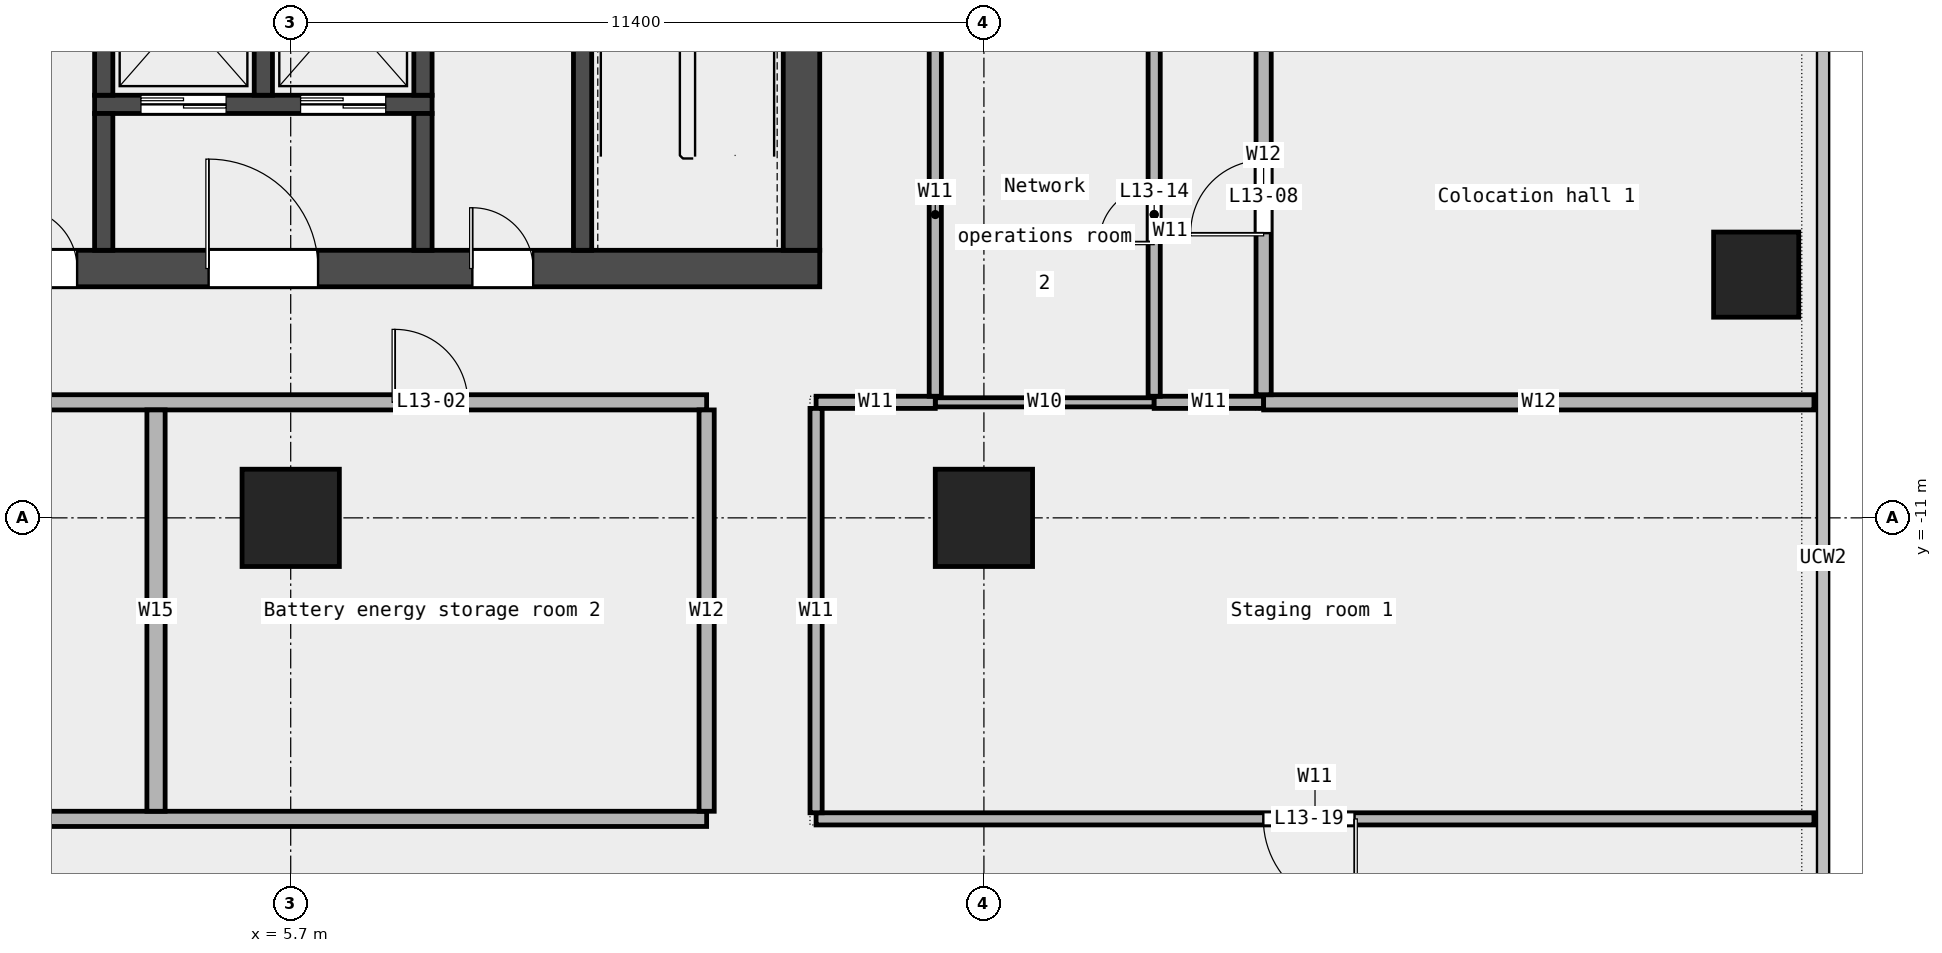
"""IFC4 building model, lengths in metres.
Left out: names, types, materials, properties, quantities, classifications, styles, units other than length and angle.
Written with IfcOpenShell. Run it as: python <this file> out.ifc"""

import sys

from ifc_helpers import new_model, si_unit, direction, frame, frame_2d, origin, origin_2d, place, context, subcontext, project, spatial, rectangle, extrude, element, fill, save


model = new_model("IFC4")
c1 = context("Model", 3, precision=1e-05, world=origin(), true_north=direction((0.0, 1.0)))
c2 = subcontext(c1, "Body", "Model", "MODEL_VIEW")
j1 = project(units=[si_unit("LENGTHUNIT", "METRE"), si_unit("PLANEANGLEUNIT", "RADIAN")], contexts=[c1])
p1 = place(None, origin())
s1 = spatial("IfcSite", under=j1, at=p1, CompositionType="ELEMENT")
p2 = place(p1, origin())
s2 = spatial("IfcBuilding", under=s1, at=p2, CompositionType="ELEMENT")
p3 = place(p2, frame((0.0, 0.0, 69.4)))
s3 = spatial("IfcBuildingStorey", under=s2, at=p3, CompositionType="ELEMENT", Elevation=69.4)
p4 = place(p3, frame((29.8, -7.0, 0.0), z_axis=(0.0, 0.0, 1.0), x_axis=(1.0, 0.0, 0.0)))
e1 = element("IfcColumn", 1, at=p4, inside=s3, PredefinedType="COLUMN", context=c2, shape_type="SweptSolid", body=[
    extrude(rectangle(XDim=1.4, YDim=1.4, at=origin_2d()), origin(), (0.0, 0.0, 1.0), 4.35),
])
for number, where, z_axis, x_axis in (
    (2, (5.7, -11.0, 0.0), (0.0, 0.0, 1.0), (1.0, 0.0, 0.0)),
    (3, (17.1, -11.0, 0.0), (0.0, 0.0, 1.0), (1.0, 0.0, 0.0)),
):
    element("IfcColumn", number, at=place(p3, frame(where, z_axis=z_axis, x_axis=x_axis)), inside=s3, PredefinedType="COLUMN", context=c2, shape_type="SweptSolid", body=[
        extrude(rectangle(XDim=1.6, YDim=1.6, at=origin_2d()), origin(), (0.0, 0.0, 1.0), 4.35),
    ])
p5 = place(p3, frame((14.34, -15.95, 0.0), z_axis=(0.0, 0.0, 1.0), x_axis=(1.0, 0.0, 0.0)))
e4 = element("IfcWall", 4, at=p5, inside=s3, PredefinedType="PARTITIONING", context=c2, shape_type="SweptSolid", body=[
    extrude(rectangle(XDim=16.41, YDim=0.2, at=frame_2d((8.205, 0.0))), origin(), (0.0, 0.0, 1.0), 4.35),
])
p6 = place(p5, frame((7.355, 0.0, 0.0)))
e5 = element("IfcOpeningElement", 5, at=p6, cuts=e4, PredefinedType="OPENING", context=c2, shape_type="SweptSolid", body=[
    extrude(rectangle(XDim=1.5, YDim=2.1, at=frame_2d((0.75, 1.05))), frame((0.0, 0.112, 0.0), z_axis=(0.0, -1.0, 0.0), x_axis=(1.0, 0.0, 0.0)), (0.0, 0.0, 1.0), 0.224),
])
p7 = place(p3, frame((-10.1, -15.95, 0.0), z_axis=(0.0, 0.0, 1.0), x_axis=(1.0, 0.0, 0.0)))
e6 = element("IfcWall", 6, at=p7, inside=s3, PredefinedType="PARTITIONING", context=c2, shape_type="SweptSolid", body=[
    extrude(rectangle(XDim=22.64, YDim=0.25, at=frame_2d((11.32, 0.0))), origin(), (0.0, 0.0, 1.0), 4.35),
])
p8 = place(p3, frame((16.3, -9.1, 0.0), z_axis=(0.0, 0.0, 1.0), x_axis=(1.0, 0.0, 0.0)))
e7 = element("IfcWall", 7, at=p8, inside=s3, PredefinedType="PARTITIONING", context=c2, shape_type="SweptSolid", body=[
    extrude(rectangle(XDim=3.6, YDim=0.15, at=frame_2d((1.8, 0.0))), origin(), (0.0, 0.0, 1.0), 4.35),
])
p9 = place(p3, frame((14.34, -9.1, 0.0), z_axis=(0.0, 0.0, 1.0), x_axis=(1.0, 0.0, 0.0)))
e8 = element("IfcWall", 8, at=p9, inside=s3, PredefinedType="PARTITIONING", context=c2, shape_type="SweptSolid", body=[
    extrude(rectangle(XDim=1.96, YDim=0.2, at=frame_2d((0.98, 0.0))), origin(), (0.0, 0.0, 1.0), 4.35),
])
p10 = place(p3, frame((19.9, -9.1, 0.0), z_axis=(0.0, 0.0, 1.0), x_axis=(1.0, 0.0, 0.0)))
e9 = element("IfcWall", 9, at=p10, inside=s3, PredefinedType="PARTITIONING", context=c2, shape_type="SweptSolid", body=[
    extrude(rectangle(XDim=1.8, YDim=0.2, at=frame_2d((0.9, 0.0))), origin(), (0.0, 0.0, 1.0), 4.35),
])
p11 = place(p3, frame((-10.1, -9.1, 0.0), z_axis=(0.0, 0.0, 1.0), x_axis=(1.0, 0.0, 0.0)))
e10 = element("IfcWall", 10, at=p11, inside=s3, PredefinedType="PARTITIONING", context=c2, shape_type="SweptSolid", body=[
    extrude(rectangle(XDim=22.64, YDim=0.25, at=frame_2d((11.32, 0.0))), origin(), (0.0, 0.0, 1.0), 4.35),
])
p12 = place(p11, frame((17.512, 0.0, 0.0)))
e11 = element("IfcOpeningElement", 11, at=p12, cuts=e10, PredefinedType="OPENING", context=c2, shape_type="SweptSolid", body=[
    extrude(rectangle(XDim=1.2, YDim=2.1, at=frame_2d((0.6, 1.05))), frame((0.0, 0.137, 0.0), z_axis=(0.0, -1.0, 0.0), x_axis=(1.0, 0.0, 0.0)), (0.0, 0.0, 1.0), 0.274),
])
p13 = place(p11, frame((6.192, 0.0, 0.0)))
e12 = element("IfcOpeningElement", 12, at=p13, cuts=e10, PredefinedType="OPENING", context=c2, shape_type="SweptSolid", body=[
    extrude(rectangle(XDim=1.2, YDim=2.1, at=frame_2d((0.6, 1.05))), frame((0.0, 0.137, 0.0), z_axis=(0.0, -1.0, 0.0), x_axis=(1.0, 0.0, 0.0)), (0.0, 0.0, 1.0), 0.274),
])
p14 = place(p3, frame((21.7, -9.1, 0.0), z_axis=(0.0, 0.0, 1.0), x_axis=(1.0, 0.0, 0.0)))
e13 = element("IfcWall", 13, at=p14, inside=s3, PredefinedType="PARTITIONING", context=c2, shape_type="SweptSolid", body=[
    extrude(rectangle(XDim=9.05, YDim=0.25, at=frame_2d((4.525, 0.0))), origin(), (0.0, 0.0, 1.0), 4.35),
])
p15 = place(p3, frame((3.485, -15.825, 0.0), z_axis=(0.0, 0.0, 1.0), x_axis=(0.0, 1.0, 0.0)))
e14 = element("IfcWall", 14, at=p15, inside=s3, PredefinedType="PARTITIONING", context=c2, shape_type="SweptSolid", body=[
    extrude(rectangle(XDim=6.6, YDim=0.3, at=frame_2d((3.3, 0.0))), origin(), (0.0, 0.0, 1.0), 4.35),
])
p16 = place(p3, frame((12.54, -15.825, 0.0), z_axis=(0.0, 0.0, 1.0), x_axis=(0.0, 1.0, 0.0)))
e15 = element("IfcWall", 15, at=p16, inside=s3, PredefinedType="PARTITIONING", context=c2, shape_type="SweptSolid", body=[
    extrude(rectangle(XDim=6.6, YDim=0.25, at=frame_2d((3.3, 0.0))), origin(), (0.0, 0.0, 1.0), 4.35),
])
p17 = place(p3, frame((14.34, -15.85, 0.0), z_axis=(0.0, 0.0, 1.0), x_axis=(0.0, 1.0, 0.0)))
e16 = element("IfcWall", 16, at=p17, inside=s3, PredefinedType="PARTITIONING", context=c2, shape_type="SweptSolid", body=[
    extrude(rectangle(XDim=6.65, YDim=0.2, at=frame_2d((3.325, 0.0))), origin(), (0.0, 0.0, 1.0), 4.35),
])
p18 = place(p3, frame((16.3, -9.0, 0.0), z_axis=(0.0, 0.0, 1.0), x_axis=(0.0, 1.0, 0.0)))
e17 = element("IfcWall", 17, at=p18, inside=s3, PredefinedType="PARTITIONING", context=c2, shape_type="SweptSolid", body=[
    extrude(rectangle(XDim=5.975, YDim=0.2, at=frame_2d((2.988, 0.0))), origin(), (0.0, 0.0, 1.0), 4.35),
])
p19 = place(p3, frame((19.9, -9.0, 0.0), z_axis=(0.0, 0.0, 1.0), x_axis=(0.0, 1.0, 0.0)))
e18 = element("IfcWall", 18, at=p19, inside=s3, PredefinedType="PARTITIONING", context=c2, shape_type="SweptSolid", body=[
    extrude(rectangle(XDim=5.975, YDim=0.2, at=frame_2d((2.988, 0.0))), origin(), (0.0, 0.0, 1.0), 4.35),
])
p20 = place(p19, frame((2.538, 0.0, 0.0)))
e19 = element("IfcOpeningElement", 19, at=p20, cuts=e18, PredefinedType="OPENING", context=c2, shape_type="SweptSolid", body=[
    extrude(rectangle(XDim=0.9, YDim=2.1, at=frame_2d((0.45, 1.05))), frame((0.0, 0.112, 0.0), z_axis=(0.0, -1.0, 0.0), x_axis=(1.0, 0.0, 0.0)), (0.0, 0.0, 1.0), 0.224),
])
p21 = place(p3, frame((21.7, -8.975, 0.0), z_axis=(0.0, 0.0, 1.0), x_axis=(0.0, 1.0, 0.0)))
e20 = element("IfcWall", 20, at=p21, inside=s3, PredefinedType="PARTITIONING", context=c2, shape_type="SweptSolid", body=[
    extrude(rectangle(XDim=6.515, YDim=0.25, at=frame_2d((3.258, 0.0))), origin(), (0.0, 0.0, 1.0), 4.35),
])
p22 = place(p21, frame((2.657, 0.0, 0.0)))
e21 = element("IfcOpeningElement", 21, at=p22, cuts=e20, PredefinedType="OPENING", context=c2, shape_type="SweptSolid", body=[
    extrude(rectangle(XDim=1.2, YDim=2.1, at=frame_2d((0.6, 1.05))), frame((0.0, 0.137, 0.0), z_axis=(0.0, -1.0, 0.0), x_axis=(1.0, 0.0, 0.0)), (0.0, 0.0, 1.0), 0.274),
])
p23 = place(p3, frame((-14.4, -6.9, 0.0), z_axis=(0.0, 0.0, 1.0), x_axis=(1.0, 0.0, 0.0)))
e22 = element("IfcWall", 22, at=p23, inside=s3, PredefinedType="SHEAR", context=c2, shape_type="SweptSolid", body=[
    extrude(rectangle(XDim=28.8, YDim=0.6, at=frame_2d((14.4, 0.0))), origin(), (0.0, 0.0, 1.0), 4.5),
])
p24 = place(p23, frame((4.337, 0.0, 0.0)))
e23 = element("IfcOpeningElement", 23, at=p24, cuts=e22, PredefinedType="OPENING", context=c2, shape_type="SweptSolid", body=[
    extrude(rectangle(XDim=1.0, YDim=2.1, at=frame_2d((0.5, 1.05))), frame((0.0, 0.312, 0.0), z_axis=(0.0, -1.0, 0.0), x_axis=(1.0, 0.0, 0.0)), (0.0, 0.0, 1.0), 0.624),
])
p25 = place(p23, frame((6.212, 0.0, 0.0)))
e24 = element("IfcOpeningElement", 24, at=p25, cuts=e22, PredefinedType="OPENING", context=c2, shape_type="SweptSolid", body=[
    extrude(rectangle(XDim=1.0, YDim=2.1, at=frame_2d((0.5, 1.05))), frame((0.0, 0.312, 0.0), z_axis=(0.0, -1.0, 0.0), x_axis=(1.0, 0.0, 0.0)), (0.0, 0.0, 1.0), 0.624),
])
p26 = place(p23, frame((10.8, 0.0, 0.0)))
e25 = element("IfcOpeningElement", 25, at=p26, cuts=e22, PredefinedType="OPENING", context=c2, shape_type="SweptSolid", body=[
    extrude(rectangle(XDim=1.2, YDim=2.1, at=frame_2d((0.6, 1.05))), frame((0.0, 0.312, 0.0), z_axis=(0.0, -1.0, 0.0), x_axis=(1.0, 0.0, 0.0)), (0.0, 0.0, 1.0), 0.624),
])
p27 = place(p23, frame((15.587, 0.0, 0.0)))
e26 = element("IfcOpeningElement", 26, at=p27, cuts=e22, PredefinedType="OPENING", context=c2, shape_type="SweptSolid", body=[
    extrude(rectangle(XDim=1.0, YDim=2.1, at=frame_2d((0.5, 1.05))), frame((0.0, 0.312, 0.0), z_axis=(0.0, -1.0, 0.0), x_axis=(1.0, 0.0, 0.0)), (0.0, 0.0, 1.0), 0.624),
])
p28 = place(p23, frame((18.75, 0.0, 0.0)))
e27 = element("IfcOpeningElement", 27, at=p28, cuts=e22, PredefinedType="OPENING", context=c2, shape_type="SweptSolid", body=[
    extrude(rectangle(XDim=1.8, YDim=2.1, at=frame_2d((0.9, 1.05))), frame((0.0, 0.312, 0.0), z_axis=(0.0, -1.0, 0.0), x_axis=(1.0, 0.0, 0.0)), (0.0, 0.0, 1.0), 0.624),
])
p29 = place(p23, frame((23.087, 0.0, 0.0)))
e28 = element("IfcOpeningElement", 28, at=p29, cuts=e22, PredefinedType="OPENING", context=c2, shape_type="SweptSolid", body=[
    extrude(rectangle(XDim=1.0, YDim=2.1, at=frame_2d((0.5, 1.05))), frame((0.0, 0.312, 0.0), z_axis=(0.0, -1.0, 0.0), x_axis=(1.0, 0.0, 0.0)), (0.0, 0.0, 1.0), 0.624),
])
p30 = place(p3, frame((14.1, -6.6, 0.0), z_axis=(0.0, 0.0, 1.0), x_axis=(0.0, 1.0, 0.0)))
e29 = element("IfcWall", 29, at=p30, inside=s3, PredefinedType="SHEAR", context=c2, shape_type="SweptSolid", body=[
    extrude(rectangle(XDim=19.5, YDim=0.6, at=frame_2d((9.75, 0.0))), origin(), (0.0, 0.0, 1.0), 4.5),
])
p31 = place(p30, frame((9.3, 0.0, 0.0)))
e30 = element("IfcOpeningElement", 30, at=p31, cuts=e29, PredefinedType="OPENING", context=c2, shape_type="SweptSolid", body=[
    extrude(rectangle(XDim=1.8, YDim=2.1, at=frame_2d((0.9, 1.05))), frame((0.0, 0.312, 0.0), z_axis=(0.0, -1.0, 0.0), x_axis=(1.0, 0.0, 0.0)), (0.0, 0.0, 1.0), 0.624),
])
p32 = place(p3, frame((10.5, -6.6, 0.0), z_axis=(0.0, 0.0, 1.0), x_axis=(0.0, 1.0, 0.0)))
e31 = element("IfcWall", 31, at=p32, inside=s3, PredefinedType="SHEAR", context=c2, shape_type="SweptSolid", body=[
    extrude(rectangle(XDim=8.55, YDim=0.3, at=frame_2d((4.275, 0.0))), origin(), (0.0, 0.0, 1.0), 4.5),
])
p33 = place(p3, frame((2.475, -4.2, 0.0), z_axis=(0.0, 0.0, 1.0), x_axis=(1.0, 0.0, 0.0)))
e32 = element("IfcWall", 32, at=p33, inside=s3, PredefinedType="SOLIDWALL", context=c2, shape_type="SweptSolid", body=[
    extrude(rectangle(XDim=5.55, YDim=0.3, at=frame_2d((2.775, 0.0))), origin(), (0.0, 0.0, 1.0), 4.5),
])
p34 = place(p33, frame((0.762, 0.0, 0.0)))
e33 = element("IfcOpeningElement", 33, at=p34, cuts=e32, PredefinedType="OPENING", context=c2, shape_type="SweptSolid", body=[
    extrude(rectangle(XDim=1.4, YDim=2.1, at=frame_2d((0.7, 1.05))), frame((0.0, 0.162, 0.0), z_axis=(0.0, -1.0, 0.0), x_axis=(1.0, 0.0, 0.0)), (0.0, 0.0, 1.0), 0.324),
])
p35 = place(p33, frame((3.387, 0.0, 0.0)))
e34 = element("IfcOpeningElement", 34, at=p35, cuts=e32, PredefinedType="OPENING", context=c2, shape_type="SweptSolid", body=[
    extrude(rectangle(XDim=1.4, YDim=2.1, at=frame_2d((0.7, 1.05))), frame((0.0, 0.162, 0.0), z_axis=(0.0, -1.0, 0.0), x_axis=(1.0, 0.0, 0.0)), (0.0, 0.0, 1.0), 0.324),
])
p36 = place(p3, frame((2.625, -4.05, 0.0), z_axis=(0.0, 0.0, 1.0), x_axis=(0.0, 1.0, 0.0)))
e35 = element("IfcWall", 35, at=p36, inside=s3, PredefinedType="SOLIDWALL", context=c2, shape_type="SweptSolid", body=[
    extrude(rectangle(XDim=2.7, YDim=0.3, at=frame_2d((1.35, 0.0))), origin(), (0.0, 0.0, 1.0), 4.5),
])
p37 = place(p3, frame((2.625, -6.6, 0.0), z_axis=(0.0, 0.0, 1.0), x_axis=(0.0, 1.0, 0.0)))
e36 = element("IfcWall", 36, at=p37, inside=s3, PredefinedType="SOLIDWALL", context=c2, shape_type="SweptSolid", body=[
    extrude(rectangle(XDim=2.25, YDim=0.3, at=frame_2d((1.125, 0.0))), origin(), (0.0, 0.0, 1.0), 4.5),
])
for number, where, z_axis, x_axis in (
    (37, (5.25, -4.05, 0.0), (0.0, 0.0, 1.0), (0.0, 1.0, 0.0)),
    (38, (7.875, -4.05, 0.0), (0.0, 0.0, 1.0), (0.0, 1.0, 0.0)),
):
    element("IfcWall", number, at=place(p3, frame(where, z_axis=z_axis, x_axis=x_axis)), inside=s3, PredefinedType="SOLIDWALL", context=c2, shape_type="SweptSolid", body=[
        extrude(rectangle(XDim=2.7, YDim=0.3, at=frame_2d((1.35, 0.0))), origin(), (0.0, 0.0, 1.0), 4.5),
    ])
p38 = place(p3, frame((7.875, -6.6, 0.0), z_axis=(0.0, 0.0, 1.0), x_axis=(0.0, 1.0, 0.0)))
e39 = element("IfcWall", 39, at=p38, inside=s3, PredefinedType="SOLIDWALL", context=c2, shape_type="SweptSolid", body=[
    extrude(rectangle(XDim=2.25, YDim=0.3, at=frame_2d((1.125, 0.0))), origin(), (0.0, 0.0, 1.0), 4.5),
])
p39 = place(p12, origin())
e40 = element("IfcDoor", 40, at=p39, inside=s3, OperationType="SINGLE_SWING_LEFT", PredefinedType="DOOR", context=c2, shape_type="SweptSolid", body=[
    extrude(rectangle(XDim=1.2, YDim=2.1, at=frame_2d((0.6, 1.05))), frame((0.0, 0.025, 0.0), z_axis=(0.0, -1.0, 0.0), x_axis=(1.0, 0.0, 0.0)), (0.0, 0.0, 1.0), 0.05),
])
fill(e11, e40)
p40 = place(p22, origin())
e41 = element("IfcDoor", 41, at=p40, inside=s3, OperationType="SINGLE_SWING_LEFT", PredefinedType="DOOR", context=c2, shape_type="SweptSolid", body=[
    extrude(rectangle(XDim=1.2, YDim=2.1, at=frame_2d((0.6, 1.05))), frame((0.0, 0.025, 0.0), z_axis=(0.0, -1.0, 0.0), x_axis=(1.0, 0.0, 0.0)), (0.0, 0.0, 1.0), 0.05),
])
fill(e21, e41)
p41 = place(p20, origin())
e42 = element("IfcDoor", 42, at=p41, inside=s3, OperationType="SINGLE_SWING_LEFT", PredefinedType="DOOR", context=c2, shape_type="SweptSolid", body=[
    extrude(rectangle(XDim=0.9, YDim=2.1, at=frame_2d((0.45, 1.05))), frame((0.0, 0.025, 0.0), z_axis=(0.0, -1.0, 0.0), x_axis=(1.0, 0.0, 0.0)), (0.0, 0.0, 1.0), 0.05),
])
fill(e19, e42)
p42 = place(p6, origin())
e43 = element("IfcDoor", 43, at=p42, inside=s3, OperationType="DOUBLE_DOOR_SINGLE_SWING", PredefinedType="DOOR", context=c2, shape_type="SweptSolid", body=[
    extrude(rectangle(XDim=1.5, YDim=2.1, at=frame_2d((0.75, 1.05))), frame((0.0, 0.025, 0.0), z_axis=(0.0, -1.0, 0.0), x_axis=(1.0, 0.0, 0.0)), (0.0, 0.0, 1.0), 0.05),
])
fill(e5, e43)
p43 = place(p34, origin())
e44 = element("IfcDoor", 44, at=p43, inside=s3, OperationType="DOUBLE_DOOR_SLIDING", PredefinedType="DOOR", context=c2, shape_type="SweptSolid", body=[
    extrude(rectangle(XDim=1.4, YDim=2.1, at=frame_2d((0.7, 1.05))), frame((0.0, 0.025, 0.0), z_axis=(0.0, -1.0, 0.0), x_axis=(1.0, 0.0, 0.0)), (0.0, 0.0, 1.0), 0.05),
])
fill(e33, e44)
p44 = place(p35, origin())
e45 = element("IfcDoor", 45, at=p44, inside=s3, OperationType="DOUBLE_DOOR_SLIDING", PredefinedType="DOOR", context=c2, shape_type="SweptSolid", body=[
    extrude(rectangle(XDim=1.4, YDim=2.1, at=frame_2d((0.7, 1.05))), frame((0.0, 0.025, 0.0), z_axis=(0.0, -1.0, 0.0), x_axis=(1.0, 0.0, 0.0)), (0.0, 0.0, 1.0), 0.05),
])
fill(e34, e45)
p45 = place(p27, origin())
e46 = element("IfcDoor", 46, at=p45, inside=s3, OperationType="SINGLE_SWING_LEFT", PredefinedType="DOOR", context=c2, shape_type="SweptSolid", body=[
    extrude(rectangle(XDim=1.0, YDim=2.1, at=frame_2d((0.5, 1.05))), frame((0.0, 0.025, 0.0), z_axis=(0.0, -1.0, 0.0), x_axis=(1.0, 0.0, 0.0)), (0.0, 0.0, 1.0), 0.05),
])
fill(e26, e46)
p46 = place(p28, origin())
e47 = element("IfcDoor", 47, at=p46, inside=s3, OperationType="DOUBLE_DOOR_SINGLE_SWING", PredefinedType="DOOR", context=c2, shape_type="SweptSolid", body=[
    extrude(rectangle(XDim=1.8, YDim=2.1, at=frame_2d((0.9, 1.05))), frame((0.0, 0.025, 0.0), z_axis=(0.0, -1.0, 0.0), x_axis=(1.0, 0.0, 0.0)), (0.0, 0.0, 1.0), 0.05),
])
fill(e27, e47)
p47 = place(p29, origin())
e48 = element("IfcDoor", 48, at=p47, inside=s3, OperationType="SINGLE_SWING_LEFT", PredefinedType="DOOR", context=c2, shape_type="SweptSolid", body=[
    extrude(rectangle(XDim=1.0, YDim=2.1, at=frame_2d((0.5, 1.05))), frame((0.0, 0.025, 0.0), z_axis=(0.0, -1.0, 0.0), x_axis=(1.0, 0.0, 0.0)), (0.0, 0.0, 1.0), 0.05),
])
fill(e28, e48)
save(model, sys.argv[1])
